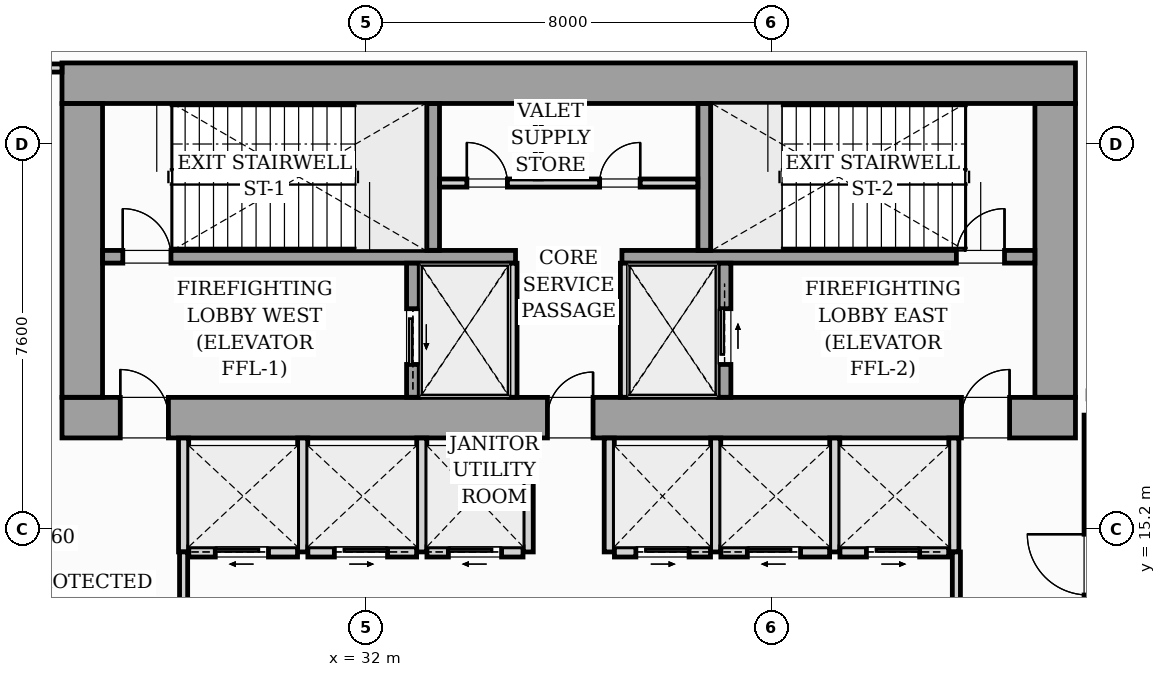
"""IFC4 building model, lengths in metres.
Left out: names, types, materials, properties, quantities, classifications, styles, units other than length and angle.
Written with IfcOpenShell. Run it as: python <this file> out.ifc"""

import sys

from ifc_helpers import new_model, si_unit, direction, frame, frame_2d, origin, origin_2d, place, context, subcontext, project, spatial, rectangle, i_section, extrude, source, transform, mapped, element, fill, save


model = new_model("IFC4")
c1 = context("Model", 3, precision=1e-05, world=origin(), true_north=direction((0.0, 1.0)))
c2 = subcontext(c1, "Body", "Model", "MODEL_VIEW")
j1 = project(units=[si_unit("LENGTHUNIT", "METRE"), si_unit("PLANEANGLEUNIT", "RADIAN")], contexts=[c1])
p1 = place(None, origin())
s1 = spatial("IfcSite", under=j1, at=p1, CompositionType="ELEMENT")
p2 = place(p1, origin())
s2 = spatial("IfcBuilding", under=s1, at=p2, CompositionType="ELEMENT")
p3 = place(p2, origin())
s3 = spatial("IfcBuildingStorey", under=s2, at=p3, CompositionType="ELEMENT", Elevation=0.0)
m1 = source(origin(), c2, "Body", "SweptSolid", [
    extrude(i_section(OverallWidth=0.437, OverallDepth=0.514, WebThickness=0.061, FlangeThickness=0.097, FilletRadius=0.018, at=origin_2d()), origin(), (0.0, 0.0, 1.0), 4.996),
])
for number, where, z_axis, x_axis in (
    (1, (26.4, 17.4, 0.002), (0.0, 0.0, 1.0), (1.0, 0.0, 0.0)),
    (2, (33.12, 17.4, 0.002), (0.0, 0.0, 1.0), (1.0, 0.0, 0.0)),
    (3, (38.88, 17.4, 0.002), (0.0, 0.0, 1.0), (1.0, 0.0, 0.0)),
    (4, (45.6, 17.4, 0.002), (0.0, 0.0, 1.0), (1.0, 0.0, 0.0)),
    (5, (26.4, 24.0, 0.002), (0.0, 0.0, 1.0), (1.0, 0.0, 0.0)),
    (6, (33.12, 24.0, 0.002), (0.0, 0.0, 1.0), (1.0, 0.0, 0.0)),
    (7, (38.88, 24.0, 0.002), (0.0, 0.0, 1.0), (1.0, 0.0, 0.0)),
    (8, (45.6, 24.0, 0.002), (0.0, 0.0, 1.0), (1.0, 0.0, 0.0)),
):
    element("IfcColumn", number, at=place(p3, frame(where, z_axis=z_axis, x_axis=x_axis)), inside=s3, PredefinedType="PILASTER", context=c2, shape_type="MappedRepresentation", body=[
        mapped(m1, transform((0.0, 0.0, 0.0), scale=1.0)),
    ])
p4 = place(p3, frame((26.0, 17.4, 0.0), z_axis=(0.0, 0.0, 1.0), x_axis=(1.0, 0.0, 0.0)))
e9 = element("IfcWall", 9, at=p4, inside=s3, PredefinedType="SHEAR", context=c2, shape_type="SweptSolid", body=[
    extrude(rectangle(XDim=20.0, YDim=0.8, at=frame_2d((10.0, 0.0))), origin(), (0.0, 0.0, 1.0), 5.0),
])
p5 = place(p4, frame((1.15, 0.0, 0.0)))
e10 = element("IfcOpeningElement", 10, at=p5, cuts=e9, PredefinedType="OPENING", context=c2, shape_type="SweptSolid", body=[
    extrude(rectangle(XDim=0.95, YDim=2.06, at=frame_2d((0.475, 1.03))), frame((0.0, 0.41, 0.0), z_axis=(0.0, -1.0, 0.0), x_axis=(1.0, 0.0, 0.0)), (0.0, 0.0, 1.0), 0.82),
])
p6 = place(p4, frame((9.58, 0.0, 0.0)))
e11 = element("IfcOpeningElement", 11, at=p6, cuts=e9, PredefinedType="OPENING", context=c2, shape_type="SweptSolid", body=[
    extrude(rectangle(XDim=0.9, YDim=2.06, at=frame_2d((0.45, 1.03))), frame((0.0, 0.41, 0.0), z_axis=(0.0, -1.0, 0.0), x_axis=(1.0, 0.0, 0.0)), (0.0, 0.0, 1.0), 0.82),
])
p7 = place(p4, frame((17.75, 0.0, 0.0)))
e12 = element("IfcOpeningElement", 12, at=p7, cuts=e9, PredefinedType="OPENING", context=c2, shape_type="SweptSolid", body=[
    extrude(rectangle(XDim=0.95, YDim=2.06, at=frame_2d((0.475, 1.03))), frame((0.0, 0.41, 0.0), z_axis=(0.0, -1.0, 0.0), x_axis=(1.0, 0.0, 0.0)), (0.0, 0.0, 1.0), 0.82),
])
p8 = place(p3, frame((26.0, 24.0, 0.0), z_axis=(0.0, 0.0, 1.0), x_axis=(1.0, 0.0, 0.0)))
e13 = element("IfcWall", 13, at=p8, inside=s3, PredefinedType="SHEAR", context=c2, shape_type="SweptSolid", body=[
    extrude(rectangle(XDim=20.0, YDim=0.8, at=frame_2d((10.0, 0.0))), origin(), (0.0, 0.0, 1.0), 5.0),
])
for number, where, z_axis, x_axis in (
    (14, (26.4, 17.802, 0.0), (0.0, 0.0, 1.0), (0.0, 1.0, 0.0)),
    (15, (45.6, 17.802, 0.0), (0.0, 0.0, 1.0), (0.0, 1.0, 0.0)),
):
    element("IfcWall", number, at=place(p3, frame(where, z_axis=z_axis, x_axis=x_axis)), inside=s3, PredefinedType="SHEAR", context=c2, shape_type="SweptSolid", body=[
        extrude(rectangle(XDim=5.796, YDim=0.8, at=frame_2d((2.898, 0.0))), origin(), (0.0, 0.0, 1.0), 5.0),
    ])
p9 = place(p3, frame((26.802, 20.575, 0.0), z_axis=(0.0, 0.0, 1.0), x_axis=(1.0, 0.0, 0.0)))
e16 = element("IfcWall", 16, at=p9, inside=s3, PredefinedType="SOLIDWALL", context=c2, shape_type="SweptSolid", body=[
    extrude(rectangle(XDim=8.148, YDim=0.25, at=frame_2d((4.074, 0.0))), origin(), (0.0, 0.0, 1.0), 5.0),
])
p10 = place(p9, frame((0.398, 0.0, 0.0)))
e17 = element("IfcOpeningElement", 17, at=p10, cuts=e16, PredefinedType="OPENING", context=c2, shape_type="SweptSolid", body=[
    extrude(rectangle(XDim=0.95, YDim=2.06, at=frame_2d((0.475, 1.03))), frame((0.0, 0.135, 0.0), z_axis=(0.0, -1.0, 0.0), x_axis=(1.0, 0.0, 0.0)), (0.0, 0.0, 1.0), 0.27),
])
p11 = place(p3, frame((37.05, 20.575, 0.0), z_axis=(0.0, 0.0, 1.0), x_axis=(1.0, 0.0, 0.0)))
e18 = element("IfcWall", 18, at=p11, inside=s3, PredefinedType="SOLIDWALL", context=c2, shape_type="SweptSolid", body=[
    extrude(rectangle(XDim=8.148, YDim=0.25, at=frame_2d((4.074, 0.0))), origin(), (0.0, 0.0, 1.0), 5.0),
])
p12 = place(p11, frame((6.6, 0.0, 0.0)))
e19 = element("IfcOpeningElement", 19, at=p12, cuts=e18, PredefinedType="OPENING", context=c2, shape_type="SweptSolid", body=[
    extrude(rectangle(XDim=0.95, YDim=2.06, at=frame_2d((0.475, 1.03))), frame((0.0, 0.135, 0.0), z_axis=(0.0, -1.0, 0.0), x_axis=(1.0, 0.0, 0.0)), (0.0, 0.0, 1.0), 0.27),
])
for number, where, z_axis, x_axis in (
    (20, (33.325, 20.702, 0.0), (0.0, 0.0, 1.0), (0.0, 1.0, 0.0)),
    (21, (38.675, 20.702, 0.0), (0.0, 0.0, 1.0), (0.0, 1.0, 0.0)),
):
    element("IfcWall", number, at=place(p3, frame(where, z_axis=z_axis, x_axis=x_axis)), inside=s3, PredefinedType="SOLIDWALL", context=c2, shape_type="SweptSolid", body=[
        extrude(rectangle(XDim=2.896, YDim=0.25, at=frame_2d((1.448, 0.0))), origin(), (0.0, 0.0, 1.0), 5.0),
    ])
p13 = place(p3, frame((32.925, 17.802, 0.0), z_axis=(0.0, 0.0, 1.0), x_axis=(0.0, 1.0, 0.0)))
e22 = element("IfcWall", 22, at=p13, inside=s3, PredefinedType="SOLIDWALL", context=c2, shape_type="SweptSolid", body=[
    extrude(rectangle(XDim=2.646, YDim=0.25, at=frame_2d((1.323, 0.0))), origin(), (0.0, 0.0, 1.0), 5.0),
])
p14 = place(p13, frame((0.648, 0.0, 0.0)))
e23 = element("IfcOpeningElement", 23, at=p14, cuts=e22, PredefinedType="OPENING", context=c2, shape_type="SweptSolid", body=[
    extrude(rectangle(XDim=1.1, YDim=2.08, at=frame_2d((0.55, 1.04))), frame((0.0, 0.135, 0.0), z_axis=(0.0, -1.0, 0.0), x_axis=(1.0, 0.0, 0.0)), (0.0, 0.0, 1.0), 0.27),
])
for number, where, z_axis, x_axis in (
    (24, (34.9, 17.802, 0.0), (0.0, 0.0, 1.0), (0.0, 1.0, 0.0)),
    (25, (37.1, 17.802, 0.0), (0.0, 0.0, 1.0), (0.0, 1.0, 0.0)),
):
    element("IfcWall", number, at=place(p3, frame(where, z_axis=z_axis, x_axis=x_axis)), inside=s3, PredefinedType="PARTITIONING", context=c2, shape_type="SweptSolid", body=[
        extrude(rectangle(XDim=2.646, YDim=0.16, at=frame_2d((1.323, 0.0))), origin(), (0.0, 0.0, 1.0), 4.58),
    ])
p15 = place(p3, frame((39.075, 17.802, 0.0), z_axis=(0.0, 0.0, 1.0), x_axis=(0.0, 1.0, 0.0)))
e26 = element("IfcWall", 26, at=p15, inside=s3, PredefinedType="SOLIDWALL", context=c2, shape_type="SweptSolid", body=[
    extrude(rectangle(XDim=2.646, YDim=0.25, at=frame_2d((1.323, 0.0))), origin(), (0.0, 0.0, 1.0), 5.0),
])
p16 = place(p15, frame((0.648, 0.0, 0.0)))
e27 = element("IfcOpeningElement", 27, at=p16, cuts=e26, PredefinedType="OPENING", context=c2, shape_type="SweptSolid", body=[
    extrude(rectangle(XDim=1.1, YDim=2.08, at=frame_2d((0.55, 1.04))), frame((0.0, 0.135, 0.0), z_axis=(0.0, -1.0, 0.0), x_axis=(1.0, 0.0, 0.0)), (0.0, 0.0, 1.0), 0.27),
])
p17 = place(p3, frame((33.452, 22.03, 0.0), z_axis=(0.0, 0.0, 1.0), x_axis=(1.0, 0.0, 0.0)))
e28 = element("IfcWall", 28, at=p17, inside=s3, PredefinedType="PARTITIONING", context=c2, shape_type="SweptSolid", body=[
    extrude(rectangle(XDim=5.096, YDim=0.16, at=frame_2d((2.548, 0.0))), origin(), (0.0, 0.0, 1.0), 4.58),
])
p18 = place(p17, frame((0.538, 0.0, 0.0)))
e29 = element("IfcOpeningElement", 29, at=p18, cuts=e28, PredefinedType="OPENING", context=c2, shape_type="SweptSolid", body=[
    extrude(rectangle(XDim=0.8, YDim=2.05, at=frame_2d((0.4, 1.025))), frame((0.0, 0.09, 0.0), z_axis=(0.0, -1.0, 0.0), x_axis=(1.0, 0.0, 0.0)), (0.0, 0.0, 1.0), 0.18),
])
p19 = place(p17, frame((3.158, 0.0, 0.0)))
e30 = element("IfcOpeningElement", 30, at=p19, cuts=e28, PredefinedType="OPENING", context=c2, shape_type="SweptSolid", body=[
    extrude(rectangle(XDim=0.8, YDim=2.05, at=frame_2d((0.4, 1.025))), frame((0.0, 0.09, 0.0), z_axis=(0.0, -1.0, 0.0), x_axis=(1.0, 0.0, 0.0)), (0.0, 0.0, 1.0), 0.18),
])
p20 = place(p3, frame((35.4, 22.112, 0.0), z_axis=(0.0, 0.0, 1.0), x_axis=(0.0, 1.0, 0.0)))
e31 = element("IfcWall", 31, at=p20, inside=s3, PredefinedType="PARTITIONING", context=c2, shape_type="SweptSolid", body=[
    extrude(rectangle(XDim=1.486, YDim=0.12, at=frame_2d((0.743, 0.0))), origin(), (0.0, 0.0, 1.0), 4.58),
])
for number, where, z_axis, x_axis in (
    (32, (28.4, 14.75, 0.0), (0.0, 0.0, 1.0), (0.0, 1.0, 0.0)),
    (33, (30.75, 14.75, 0.0), (0.0, 0.0, 1.0), (0.0, 1.0, 0.0)),
    (34, (33.1, 14.75, 0.0), (0.0, 0.0, 1.0), (0.0, 1.0, 0.0)),
):
    element("IfcWall", number, at=place(p3, frame(where, z_axis=z_axis, x_axis=x_axis)), inside=s3, PredefinedType="PARTITIONING", context=c2, shape_type="SweptSolid", body=[
        extrude(rectangle(XDim=2.248, YDim=0.2, at=frame_2d((1.124, 0.0))), origin(), (0.0, 0.0, 1.0), 4.58),
    ])
p21 = place(p3, frame((28.502, 14.75, 0.0), z_axis=(0.0, 0.0, 1.0), x_axis=(1.0, 0.0, 0.0)))
e35 = element("IfcWall", 35, at=p21, inside=s3, PredefinedType="PARTITIONING", context=c2, shape_type="SweptSolid", body=[
    extrude(rectangle(XDim=2.146, YDim=0.2, at=frame_2d((1.073, 0.0))), origin(), (0.0, 0.0, 1.0), 4.58),
])
p22 = place(p21, frame((0.523, 0.0, 0.0)))
e36 = element("IfcOpeningElement", 36, at=p22, cuts=e35, PredefinedType="OPENING", context=c2, shape_type="SweptSolid", body=[
    extrude(rectangle(XDim=1.05, YDim=2.08, at=frame_2d((0.525, 1.04))), frame((0.0, 0.11, 0.0), z_axis=(0.0, -1.0, 0.0), x_axis=(1.0, 0.0, 0.0)), (0.0, 0.0, 1.0), 0.22),
])
p23 = place(p3, frame((30.852, 14.75, 0.0), z_axis=(0.0, 0.0, 1.0), x_axis=(1.0, 0.0, 0.0)))
e37 = element("IfcWall", 37, at=p23, inside=s3, PredefinedType="PARTITIONING", context=c2, shape_type="SweptSolid", body=[
    extrude(rectangle(XDim=2.146, YDim=0.2, at=frame_2d((1.073, 0.0))), origin(), (0.0, 0.0, 1.0), 4.58),
])
p24 = place(p23, frame((0.523, 0.0, 0.0)))
e38 = element("IfcOpeningElement", 38, at=p24, cuts=e37, PredefinedType="OPENING", context=c2, shape_type="SweptSolid", body=[
    extrude(rectangle(XDim=1.05, YDim=2.08, at=frame_2d((0.525, 1.04))), frame((0.0, 0.11, 0.0), z_axis=(0.0, -1.0, 0.0), x_axis=(1.0, 0.0, 0.0)), (0.0, 0.0, 1.0), 0.22),
])
p25 = place(p3, frame((35.2, 14.75, 0.0), z_axis=(0.0, 0.0, 1.0), x_axis=(0.0, 1.0, 0.0)))
e39 = element("IfcWall", 39, at=p25, inside=s3, PredefinedType="PARTITIONING", context=c2, shape_type="SweptSolid", body=[
    extrude(rectangle(XDim=2.248, YDim=0.2, at=frame_2d((1.124, 0.0))), origin(), (0.0, 0.0, 1.0), 4.58),
])
p26 = place(p3, frame((33.202, 14.75, 0.0), z_axis=(0.0, 0.0, 1.0), x_axis=(1.0, 0.0, 0.0)))
e40 = element("IfcWall", 40, at=p26, inside=s3, PredefinedType="PARTITIONING", context=c2, shape_type="SweptSolid", body=[
    extrude(rectangle(XDim=1.896, YDim=0.2, at=frame_2d((0.948, 0.0))), origin(), (0.0, 0.0, 1.0), 4.58),
])
p27 = place(p26, frame((0.423, 0.0, 0.0)))
e41 = element("IfcOpeningElement", 41, at=p27, cuts=e40, PredefinedType="OPENING", context=c2, shape_type="SweptSolid", body=[
    extrude(rectangle(XDim=1.05, YDim=2.08, at=frame_2d((0.525, 1.04))), frame((0.0, 0.11, 0.0), z_axis=(0.0, -1.0, 0.0), x_axis=(1.0, 0.0, 0.0)), (0.0, 0.0, 1.0), 0.22),
])
for number, where, z_axis, x_axis in (
    (42, (36.8, 14.75, 0.0), (0.0, 0.0, 1.0), (0.0, 1.0, 0.0)),
    (43, (38.9, 14.75, 0.0), (0.0, 0.0, 1.0), (0.0, 1.0, 0.0)),
):
    element("IfcWall", number, at=place(p3, frame(where, z_axis=z_axis, x_axis=x_axis)), inside=s3, PredefinedType="PARTITIONING", context=c2, shape_type="SweptSolid", body=[
        extrude(rectangle(XDim=2.248, YDim=0.2, at=frame_2d((1.124, 0.0))), origin(), (0.0, 0.0, 1.0), 4.58),
    ])
p28 = place(p3, frame((36.902, 14.75, 0.0), z_axis=(0.0, 0.0, 1.0), x_axis=(1.0, 0.0, 0.0)))
e44 = element("IfcWall", 44, at=p28, inside=s3, PredefinedType="PARTITIONING", context=c2, shape_type="SweptSolid", body=[
    extrude(rectangle(XDim=1.896, YDim=0.2, at=frame_2d((0.948, 0.0))), origin(), (0.0, 0.0, 1.0), 4.58),
])
p29 = place(p28, frame((0.423, 0.0, 0.0)))
e45 = element("IfcOpeningElement", 45, at=p29, cuts=e44, PredefinedType="OPENING", context=c2, shape_type="SweptSolid", body=[
    extrude(rectangle(XDim=1.05, YDim=2.08, at=frame_2d((0.525, 1.04))), frame((0.0, 0.11, 0.0), z_axis=(0.0, -1.0, 0.0), x_axis=(1.0, 0.0, 0.0)), (0.0, 0.0, 1.0), 0.22),
])
for number, where, z_axis, x_axis in (
    (46, (41.25, 14.75, 0.0), (0.0, 0.0, 1.0), (0.0, 1.0, 0.0)),
    (47, (43.6, 14.75, 0.0), (0.0, 0.0, 1.0), (0.0, 1.0, 0.0)),
):
    element("IfcWall", number, at=place(p3, frame(where, z_axis=z_axis, x_axis=x_axis)), inside=s3, PredefinedType="PARTITIONING", context=c2, shape_type="SweptSolid", body=[
        extrude(rectangle(XDim=2.248, YDim=0.2, at=frame_2d((1.124, 0.0))), origin(), (0.0, 0.0, 1.0), 4.58),
    ])
p30 = place(p3, frame((39.002, 14.75, 0.0), z_axis=(0.0, 0.0, 1.0), x_axis=(1.0, 0.0, 0.0)))
e48 = element("IfcWall", 48, at=p30, inside=s3, PredefinedType="PARTITIONING", context=c2, shape_type="SweptSolid", body=[
    extrude(rectangle(XDim=2.146, YDim=0.2, at=frame_2d((1.073, 0.0))), origin(), (0.0, 0.0, 1.0), 4.58),
])
p31 = place(p30, frame((0.523, 0.0, 0.0)))
e49 = element("IfcOpeningElement", 49, at=p31, cuts=e48, PredefinedType="OPENING", context=c2, shape_type="SweptSolid", body=[
    extrude(rectangle(XDim=1.05, YDim=2.08, at=frame_2d((0.525, 1.04))), frame((0.0, 0.11, 0.0), z_axis=(0.0, -1.0, 0.0), x_axis=(1.0, 0.0, 0.0)), (0.0, 0.0, 1.0), 0.22),
])
p32 = place(p3, frame((41.352, 14.75, 0.0), z_axis=(0.0, 0.0, 1.0), x_axis=(1.0, 0.0, 0.0)))
e50 = element("IfcWall", 50, at=p32, inside=s3, PredefinedType="PARTITIONING", context=c2, shape_type="SweptSolid", body=[
    extrude(rectangle(XDim=2.146, YDim=0.2, at=frame_2d((1.073, 0.0))), origin(), (0.0, 0.0, 1.0), 4.58),
])
p33 = place(p32, frame((0.523, 0.0, 0.0)))
e51 = element("IfcOpeningElement", 51, at=p33, cuts=e50, PredefinedType="OPENING", context=c2, shape_type="SweptSolid", body=[
    extrude(rectangle(XDim=1.05, YDim=2.08, at=frame_2d((0.525, 1.04))), frame((0.0, 0.11, 0.0), z_axis=(0.0, -1.0, 0.0), x_axis=(1.0, 0.0, 0.0)), (0.0, 0.0, 1.0), 0.22),
])
p34 = place(p3, frame((28.4, 1.102, 0.0), z_axis=(0.0, 0.0, 1.0), x_axis=(0.0, 1.0, 0.0)))
e52 = element("IfcWall", 52, at=p34, inside=s3, PredefinedType="PARTITIONING", context=c2, shape_type="SweptSolid", body=[
    extrude(rectangle(XDim=13.648, YDim=0.16, at=frame_2d((6.824, 0.0))), origin(), (0.0, 0.0, 1.0), 4.58),
])
p35 = place(p34, frame((6.348, 0.0, 0.0)))
e53 = element("IfcOpeningElement", 53, at=p35, cuts=e52, PredefinedType="OPENING", context=c2, shape_type="SweptSolid", body=[
    extrude(rectangle(XDim=1.2, YDim=2.08, at=frame_2d((0.6, 1.04))), frame((0.0, 0.09, 0.0), z_axis=(0.0, -1.0, 0.0), x_axis=(1.0, 0.0, 0.0)), (0.0, 0.0, 1.0), 0.18),
])
p36 = place(p3, frame((43.65, 1.102, 0.0), z_axis=(0.0, 0.0, 1.0), x_axis=(0.0, 1.0, 0.0)))
e54 = element("IfcWall", 54, at=p36, inside=s3, PredefinedType="PARTITIONING", context=c2, shape_type="SweptSolid", body=[
    extrude(rectangle(XDim=13.648, YDim=0.16, at=frame_2d((6.824, 0.0))), origin(), (0.0, 0.0, 1.0), 4.58),
])
p37 = place(p36, frame((6.348, 0.0, 0.0)))
e55 = element("IfcOpeningElement", 55, at=p37, cuts=e54, PredefinedType="OPENING", context=c2, shape_type="SweptSolid", body=[
    extrude(rectangle(XDim=1.2, YDim=2.08, at=frame_2d((0.6, 1.04))), frame((0.0, 0.09, 0.0), z_axis=(0.0, -1.0, 0.0), x_axis=(1.0, 0.0, 0.0)), (0.0, 0.0, 1.0), 0.18),
])
p38 = place(p3, frame((46.25, 1.102, 0.0), z_axis=(0.0, 0.0, 1.0), x_axis=(0.0, 1.0, 0.0)))
e56 = element("IfcWall", 56, at=p38, inside=s3, PredefinedType="PARTITIONING", context=c2, shape_type="SweptSolid", body=[
    extrude(rectangle(XDim=16.348, YDim=0.16, at=frame_2d((8.174, 0.0))), origin(), (0.0, 0.0, 1.0), 4.58),
])
p39 = place(p38, frame((5.348, 0.0, 0.0)))
e57 = element("IfcOpeningElement", 57, at=p39, cuts=e56, PredefinedType="OPENING", context=c2, shape_type="SweptSolid", body=[
    extrude(rectangle(XDim=1.2, YDim=2.08, at=frame_2d((0.6, 1.04))), frame((0.0, 0.09, 0.0), z_axis=(0.0, -1.0, 0.0), x_axis=(1.0, 0.0, 0.0)), (0.0, 0.0, 1.0), 0.18),
])
p40 = place(p38, frame((12.798, 0.0, 0.0)))
e58 = element("IfcOpeningElement", 58, at=p40, cuts=e56, PredefinedType="OPENING", context=c2, shape_type="SweptSolid", body=[
    extrude(rectangle(XDim=1.2, YDim=2.08, at=frame_2d((0.6, 1.04))), frame((0.0, 0.09, 0.0), z_axis=(0.0, -1.0, 0.0), x_axis=(1.0, 0.0, 0.0)), (0.0, 0.0, 1.0), 0.18),
])
p41 = place(p3, frame((24.682, 24.3, 0.0), z_axis=(0.0, 0.0, 1.0), x_axis=(1.0, 0.0, 0.0)))
e59 = element("IfcWall", 59, at=p41, inside=s3, PredefinedType="PARTITIONING", context=c2, shape_type="SweptSolid", body=[
    extrude(rectangle(XDim=1.318, YDim=0.16, at=frame_2d((0.659, 0.0))), origin(), (0.0, 0.0, 1.0), 4.58),
])
m2 = source(origin(), c2, "Body", "SweptSolid", [
    extrude(rectangle(XDim=0.95, YDim=2.06, at=frame_2d((0.475, 1.03))), frame((0.0, 0.025, 0.0), z_axis=(0.0, -1.0, 0.0), x_axis=(1.0, 0.0, 0.0)), (0.0, 0.0, 1.0), 0.05),
])
p42 = place(p5, origin())
e60 = element("IfcDoor", 60, at=p42, inside=s3, OperationType="SINGLE_SWING_LEFT", PredefinedType="DOOR", context=c2, shape_type="MappedRepresentation", body=[
    mapped(m2, transform((0.0, 0.0, 0.0), scale=1.0)),
])
fill(e10, e60)
m3 = source(origin(), c2, "Body", "SweptSolid", [
    extrude(rectangle(XDim=0.9, YDim=2.06, at=frame_2d((0.45, 1.03))), frame((0.0, 0.025, 0.0), z_axis=(0.0, -1.0, 0.0), x_axis=(1.0, 0.0, 0.0)), (0.0, 0.0, 1.0), 0.05),
])
p43 = place(p6, origin())
e61 = element("IfcDoor", 61, at=p43, inside=s3, OperationType="SINGLE_SWING_RIGHT", PredefinedType="DOOR", context=c2, shape_type="MappedRepresentation", body=[
    mapped(m3, transform((0.0, 0.0, 0.0), scale=1.0)),
])
fill(e11, e61)
p44 = place(p7, origin())
e62 = element("IfcDoor", 62, at=p44, inside=s3, OperationType="SINGLE_SWING_RIGHT", PredefinedType="DOOR", context=c2, shape_type="MappedRepresentation", body=[
    mapped(m2, transform((0.0, 0.0, 0.0), scale=1.0)),
])
fill(e12, e62)
p45 = place(p10, origin())
e63 = element("IfcDoor", 63, at=p45, inside=s3, OperationType="SINGLE_SWING_LEFT", PredefinedType="DOOR", context=c2, shape_type="MappedRepresentation", body=[
    mapped(m2, transform((0.0, 0.0, 0.0), scale=1.0)),
])
fill(e17, e63)
p46 = place(p12, origin())
e64 = element("IfcDoor", 64, at=p46, inside=s3, OperationType="SINGLE_SWING_RIGHT", PredefinedType="DOOR", context=c2, shape_type="MappedRepresentation", body=[
    mapped(m2, transform((0.0, 0.0, 0.0), scale=1.0)),
])
fill(e19, e64)
m4 = source(origin(), c2, "Body", "SweptSolid", [
    extrude(rectangle(XDim=1.1, YDim=2.08, at=frame_2d((0.55, 1.04))), frame((0.0, 0.025, 0.0), z_axis=(0.0, -1.0, 0.0), x_axis=(1.0, 0.0, 0.0)), (0.0, 0.0, 1.0), 0.05),
])
p47 = place(p14, origin())
e65 = element("IfcDoor", 65, at=p47, inside=s3, OperationType="SLIDING_TO_LEFT", PredefinedType="DOOR", context=c2, shape_type="MappedRepresentation", body=[
    mapped(m4, transform((0.0, 0.0, 0.0), scale=1.0)),
])
fill(e23, e65)
p48 = place(p16, origin())
e66 = element("IfcDoor", 66, at=p48, inside=s3, OperationType="SLIDING_TO_RIGHT", PredefinedType="DOOR", context=c2, shape_type="MappedRepresentation", body=[
    mapped(m4, transform((0.0, 0.0, 0.0), scale=1.0)),
])
fill(e27, e66)
m5 = source(origin(), c2, "Body", "SweptSolid", [
    extrude(rectangle(XDim=0.8, YDim=2.05, at=frame_2d((0.4, 1.025))), frame((0.0, 0.025, 0.0), z_axis=(0.0, -1.0, 0.0), x_axis=(1.0, 0.0, 0.0)), (0.0, 0.0, 1.0), 0.05),
])
p49 = place(p18, origin())
e67 = element("IfcDoor", 67, at=p49, inside=s3, OperationType="SINGLE_SWING_LEFT", PredefinedType="DOOR", context=c2, shape_type="MappedRepresentation", body=[
    mapped(m5, transform((0.0, 0.0, 0.0), scale=1.0)),
])
fill(e29, e67)
p50 = place(p19, origin())
e68 = element("IfcDoor", 68, at=p50, inside=s3, OperationType="SINGLE_SWING_RIGHT", PredefinedType="DOOR", context=c2, shape_type="MappedRepresentation", body=[
    mapped(m5, transform((0.0, 0.0, 0.0), scale=1.0)),
])
fill(e30, e68)
m6 = source(origin(), c2, "Body", "SweptSolid", [
    extrude(rectangle(XDim=1.05, YDim=2.08, at=frame_2d((0.525, 1.04))), frame((0.0, 0.025, 0.0), z_axis=(0.0, -1.0, 0.0), x_axis=(1.0, 0.0, 0.0)), (0.0, 0.0, 1.0), 0.05),
])
p51 = place(p22, origin())
e69 = element("IfcDoor", 69, at=p51, inside=s3, OperationType="SLIDING_TO_LEFT", PredefinedType="DOOR", context=c2, shape_type="MappedRepresentation", body=[
    mapped(m6, transform((0.0, 0.0, 0.0), scale=1.0)),
])
fill(e36, e69)
p52 = place(p24, origin())
e70 = element("IfcDoor", 70, at=p52, inside=s3, OperationType="SLIDING_TO_RIGHT", PredefinedType="DOOR", context=c2, shape_type="MappedRepresentation", body=[
    mapped(m6, transform((0.0, 0.0, 0.0), scale=1.0)),
])
fill(e38, e70)
p53 = place(p27, origin())
e71 = element("IfcDoor", 71, at=p53, inside=s3, OperationType="SLIDING_TO_LEFT", PredefinedType="DOOR", context=c2, shape_type="MappedRepresentation", body=[
    mapped(m6, transform((0.0, 0.0, 0.0), scale=1.0)),
])
fill(e41, e71)
p54 = place(p29, origin())
e72 = element("IfcDoor", 72, at=p54, inside=s3, OperationType="SLIDING_TO_RIGHT", PredefinedType="DOOR", context=c2, shape_type="MappedRepresentation", body=[
    mapped(m6, transform((0.0, 0.0, 0.0), scale=1.0)),
])
fill(e45, e72)
p55 = place(p31, origin())
e73 = element("IfcDoor", 73, at=p55, inside=s3, OperationType="SLIDING_TO_LEFT", PredefinedType="DOOR", context=c2, shape_type="MappedRepresentation", body=[
    mapped(m6, transform((0.0, 0.0, 0.0), scale=1.0)),
])
fill(e49, e73)
p56 = place(p33, origin())
e74 = element("IfcDoor", 74, at=p56, inside=s3, OperationType="SLIDING_TO_RIGHT", PredefinedType="DOOR", context=c2, shape_type="MappedRepresentation", body=[
    mapped(m6, transform((0.0, 0.0, 0.0), scale=1.0)),
])
fill(e51, e74)
save(model, sys.argv[1])
